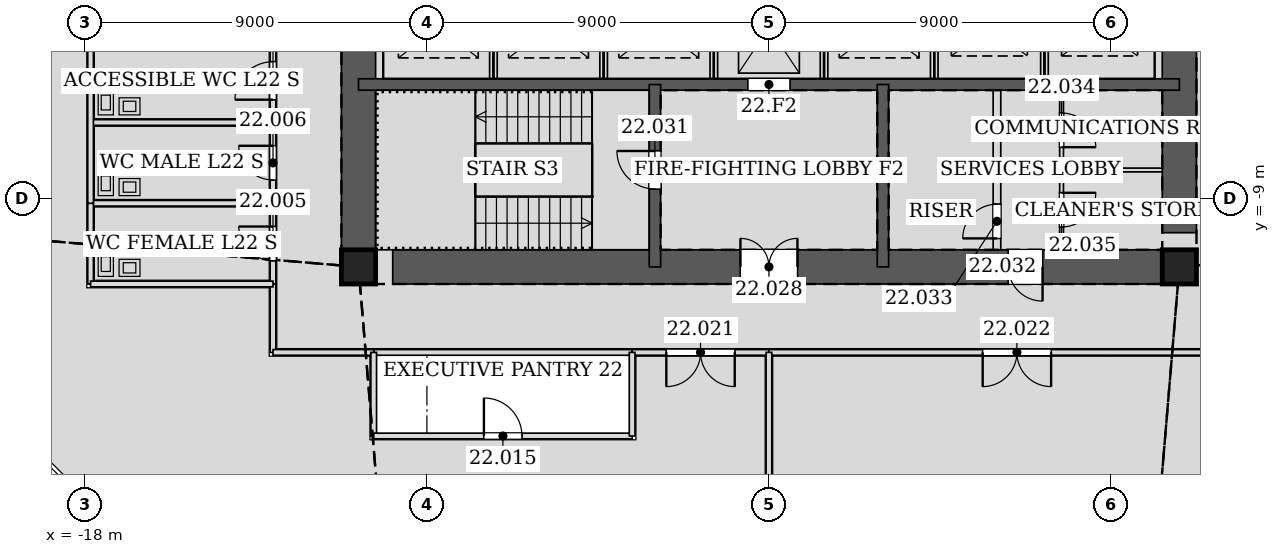
"""IFC4 building model, lengths in metres.
Left out: names, types, materials, properties, quantities, classifications, styles, units other than length and angle.
Written with IfcOpenShell. Run it as: python <this file> out.ifc"""

import sys

from ifc_helpers import new_model, si_unit, direction, frame, frame_2d, origin, origin_2d, place, context, subcontext, project, spatial, rectangle, hollow_rectangle, extrude, element, fill, save


model = new_model("IFC4")
c1 = context("Model", 3, precision=1e-05, world=origin(), true_north=direction((0.0, 1.0)))
c2 = subcontext(c1, "Body", "Model", "MODEL_VIEW")
j1 = project(units=[si_unit("LENGTHUNIT", "METRE"), si_unit("PLANEANGLEUNIT", "RADIAN")], contexts=[c1])
p1 = place(None, origin())
s1 = spatial("IfcSite", under=j1, at=p1, CompositionType="ELEMENT")
p2 = place(p1, origin())
s2 = spatial("IfcBuilding", under=s1, at=p2, CompositionType="ELEMENT")
p3 = place(p2, frame((0.0, 0.0, 100.2)))
s3 = spatial("IfcBuildingStorey", under=s2, at=p3, CompositionType="ELEMENT", Elevation=100.2)
for number, where, z_axis, x_axis in (
    (1, (-10.8, -10.8, 0.0), (0.0, 0.0, 1.0), (1.0, 0.0, 0.0)),
    (2, (10.8, -10.8, 0.0), (0.0, 0.0, 1.0), (1.0, 0.0, 0.0)),
):
    element("IfcColumn", number, at=place(p3, frame(where, z_axis=z_axis, x_axis=x_axis)), inside=s3, PredefinedType="COLUMN", context=c2, shape_type="SweptSolid", body=[
        extrude(hollow_rectangle(XDim=0.9, YDim=0.9, WallThickness=0.06, at=origin_2d()), origin(), (0.0, 0.0, 1.0), 4.2),
    ])
p4 = place(p3, frame((-10.8, -10.8, 0.0), z_axis=(0.0, 0.0, 1.0), x_axis=(1.0, 0.0, 0.0)))
e3 = element("IfcWall", 3, at=p4, inside=s3, PredefinedType="SOLIDWALL", context=c2, shape_type="SweptSolid", body=[
    extrude(rectangle(XDim=21.6, YDim=0.9, at=frame_2d((10.8, 0.0))), origin(), (0.0, 0.0, 1.0), 4.2),
])
p5 = place(p4, frame((10.05, 0.0, 0.0)))
e4 = element("IfcOpeningElement", 4, at=p5, cuts=e3, PredefinedType="OPENING", context=c2, shape_type="SweptSolid", body=[
    extrude(rectangle(XDim=1.5, YDim=2.1, at=frame_2d((0.75, 1.05))), frame((0.0, 0.46, 0.0), z_axis=(0.0, -1.0, 0.0), x_axis=(1.0, 0.0, 0.0)), (0.0, 0.0, 1.0), 0.92),
])
p6 = place(p4, frame((17.1, 0.0, 0.0)))
e5 = element("IfcOpeningElement", 5, at=p6, cuts=e3, PredefinedType="OPENING", context=c2, shape_type="SweptSolid", body=[
    extrude(rectangle(XDim=0.9, YDim=2.1, at=frame_2d((0.45, 1.05))), frame((0.0, 0.46, 0.0), z_axis=(0.0, -1.0, 0.0), x_axis=(1.0, 0.0, 0.0)), (0.0, 0.0, 1.0), 0.92),
])
p7 = place(p3, frame((10.8, -10.8, 0.0), z_axis=(0.0, 0.0, 1.0), x_axis=(0.0, 1.0, 0.0)))
e6 = element("IfcWall", 6, at=p7, inside=s3, PredefinedType="SOLIDWALL", context=c2, shape_type="SweptSolid", body=[
    extrude(rectangle(XDim=21.6, YDim=0.9, at=frame_2d((10.8, 0.0))), origin(), (0.0, 0.0, 1.0), 4.2),
])
p8 = place(p7, frame((11.7, 0.0, 0.0)))
e7 = element("IfcOpeningElement", 7, at=p8, cuts=e6, PredefinedType="OPENING", context=c2, shape_type="SweptSolid", body=[
    extrude(rectangle(XDim=1.2, YDim=2.1, at=frame_2d((0.6, 1.05))), frame((0.0, 0.46, 0.0), z_axis=(0.0, -1.0, 0.0), x_axis=(1.0, 0.0, 0.0)), (0.0, 0.0, 1.0), 0.92),
])
p9 = place(p7, frame((8.7, 0.0, 0.0)))
e8 = element("IfcOpeningElement", 8, at=p9, cuts=e6, PredefinedType="OPENING", context=c2, shape_type="SweptSolid", body=[
    extrude(rectangle(XDim=1.2, YDim=2.1, at=frame_2d((0.6, 1.05))), frame((0.0, 0.46, 0.0), z_axis=(0.0, -1.0, 0.0), x_axis=(1.0, 0.0, 0.0)), (0.0, 0.0, 1.0), 0.92),
])
p10 = place(p3, frame((-10.8, 10.8, 0.0), z_axis=(0.0, 0.0, 1.0), x_axis=(0.0, -1.0, 0.0)))
e9 = element("IfcWall", 9, at=p10, inside=s3, PredefinedType="SOLIDWALL", context=c2, shape_type="SweptSolid", body=[
    extrude(rectangle(XDim=21.6, YDim=0.9, at=frame_2d((10.8, 0.0))), origin(), (0.0, 0.0, 1.0), 4.2),
])
p11 = place(p10, frame((8.7, 0.0, 0.0)))
e10 = element("IfcOpeningElement", 10, at=p11, cuts=e9, PredefinedType="OPENING", context=c2, shape_type="SweptSolid", body=[
    extrude(rectangle(XDim=1.2, YDim=2.1, at=frame_2d((0.6, 1.05))), frame((0.0, 0.46, 0.0), z_axis=(0.0, -1.0, 0.0), x_axis=(1.0, 0.0, 0.0)), (0.0, 0.0, 1.0), 0.92),
])
p12 = place(p10, frame((11.7, 0.0, 0.0)))
e11 = element("IfcOpeningElement", 11, at=p12, cuts=e9, PredefinedType="OPENING", context=c2, shape_type="SweptSolid", body=[
    extrude(rectangle(XDim=1.2, YDim=2.1, at=frame_2d((0.6, 1.05))), frame((0.0, 0.46, 0.0), z_axis=(0.0, -1.0, 0.0), x_axis=(1.0, 0.0, 0.0)), (0.0, 0.0, 1.0), 0.92),
])
p13 = place(p3, frame((-10.8, -6.0, 0.0), z_axis=(0.0, 0.0, 1.0), x_axis=(1.0, 0.0, 0.0)))
e12 = element("IfcWall", 12, at=p13, inside=s3, PredefinedType="SOLIDWALL", context=c2, shape_type="SweptSolid", body=[
    extrude(rectangle(XDim=21.6, YDim=0.3, at=frame_2d((10.8, 0.0))), origin(), (0.0, 0.0, 1.0), 4.2),
])
p14 = place(p13, frame((10.25, 0.0, 0.0)))
e13 = element("IfcOpeningElement", 13, at=p14, cuts=e12, PredefinedType="OPENING", context=c2, shape_type="SweptSolid", body=[
    extrude(rectangle(XDim=1.1, YDim=2.1, at=frame_2d((0.55, 1.05))), frame((0.0, 0.16, 0.0), z_axis=(0.0, -1.0, 0.0), x_axis=(1.0, 0.0, 0.0)), (0.0, 0.0, 1.0), 0.32),
])
p15 = place(p3, frame((-3.0, -6.0, 0.0), z_axis=(0.0, 0.0, 1.0), x_axis=(0.0, -1.0, 0.0)))
e14 = element("IfcWall", 14, at=p15, inside=s3, PredefinedType="SOLIDWALL", context=c2, shape_type="SweptSolid", body=[
    extrude(rectangle(XDim=4.8, YDim=0.3, at=frame_2d((2.4, 0.0))), origin(), (0.0, 0.0, 1.0), 4.2),
])
p16 = place(p15, frame((1.75, 0.0, 0.0)))
e15 = element("IfcOpeningElement", 15, at=p16, cuts=e14, PredefinedType="OPENING", context=c2, shape_type="SweptSolid", body=[
    extrude(rectangle(XDim=1.0, YDim=2.1, at=frame_2d((0.5, 1.05))), frame((0.0, 0.16, 0.0), z_axis=(0.0, -1.0, 0.0), x_axis=(1.0, 0.0, 0.0)), (0.0, 0.0, 1.0), 0.32),
])
p17 = place(p3, frame((3.0, -6.0, 0.0), z_axis=(0.0, 0.0, 1.0), x_axis=(0.0, -1.0, 0.0)))
e16 = element("IfcWall", 16, at=p17, inside=s3, PredefinedType="SOLIDWALL", context=c2, shape_type="SweptSolid", body=[
    extrude(rectangle(XDim=4.8, YDim=0.3, at=frame_2d((2.4, 0.0))), origin(), (0.0, 0.0, 1.0), 4.2),
])
p18 = place(p3, frame((-13.05, -9.124, 0.0), z_axis=(0.0, 0.0, 1.0), x_axis=(0.0, -1.0, 0.0)))
e17 = element("IfcWall", 17, at=p18, inside=s3, PredefinedType="PARTITIONING", context=c2, shape_type="SweptSolid", body=[
    extrude(rectangle(XDim=2.127, YDim=0.15, at=frame_2d((1.063, 0.0))), origin(), (0.0, 0.0, 1.0), 3.04),
])
p19 = place(p18, frame((0.614, 0.0, 0.0)))
e18 = element("IfcOpeningElement", 18, at=p19, cuts=e17, PredefinedType="OPENING", context=c2, shape_type="SweptSolid", body=[
    extrude(rectangle(XDim=0.9, YDim=2.1, at=frame_2d((0.45, 1.05))), frame((0.0, 0.085, 0.0), z_axis=(0.0, -1.0, 0.0), x_axis=(1.0, 0.0, 0.0)), (0.0, 0.0, 1.0), 0.17),
])
p20 = place(p3, frame((-13.05, -6.999, 0.0), z_axis=(0.0, 0.0, 1.0), x_axis=(0.0, -1.0, 0.0)))
e19 = element("IfcWall", 19, at=p20, inside=s3, PredefinedType="PARTITIONING", context=c2, shape_type="SweptSolid", body=[
    extrude(rectangle(XDim=2.127, YDim=0.15, at=frame_2d((1.063, 0.0))), origin(), (0.0, 0.0, 1.0), 3.95),
])
p21 = place(p20, frame((0.614, 0.0, 0.0)))
e20 = element("IfcOpeningElement", 20, at=p21, cuts=e19, PredefinedType="OPENING", context=c2, shape_type="SweptSolid", body=[
    extrude(rectangle(XDim=0.9, YDim=2.1, at=frame_2d((0.45, 1.05))), frame((0.0, 0.085, 0.0), z_axis=(0.0, -1.0, 0.0), x_axis=(1.0, 0.0, 0.0)), (0.0, 0.0, 1.0), 0.17),
])
p22 = place(p3, frame((-13.05, -4.799, 0.0), z_axis=(0.0, 0.0, 1.0), x_axis=(0.0, -1.0, 0.0)))
e21 = element("IfcWall", 21, at=p22, inside=s3, PredefinedType="PARTITIONING", context=c2, shape_type="SweptSolid", body=[
    extrude(rectangle(XDim=2.202, YDim=0.15, at=frame_2d((1.101, 0.0))), origin(), (0.0, 0.0, 1.0), 3.95),
])
p23 = place(p22, frame((0.601, 0.0, 0.0)))
e22 = element("IfcOpeningElement", 22, at=p23, cuts=e21, PredefinedType="OPENING", context=c2, shape_type="SweptSolid", body=[
    extrude(rectangle(XDim=1.0, YDim=2.1, at=frame_2d((0.5, 1.05))), frame((0.0, 0.085, 0.0), z_axis=(0.0, -1.0, 0.0), x_axis=(1.0, 0.0, 0.0)), (0.0, 0.0, 1.0), 0.17),
])
p24 = place(p3, frame((-10.401, -13.05, 0.0), z_axis=(0.0, 0.0, 1.0), x_axis=(1.0, 0.0, 0.0)))
e23 = element("IfcWall", 23, at=p24, inside=s3, PredefinedType="PARTITIONING", context=c2, shape_type="SweptSolid", body=[
    extrude(rectangle(XDim=6.802, YDim=0.15, at=frame_2d((3.401, 0.0))), origin(), (0.0, 0.0, 1.0), 3.04),
])
p25 = place(p3, frame((-13.05, -11.249, 0.0), z_axis=(0.0, 0.0, 1.0), x_axis=(0.0, -1.0, 0.0)))
e24 = element("IfcWall", 24, at=p25, inside=s3, PredefinedType="PARTITIONING", context=c2, shape_type="SweptSolid", body=[
    extrude(rectangle(XDim=1.801, YDim=0.15, at=frame_2d((0.9, 0.0))), origin(), (0.0, 0.0, 1.0), 2.84),
])
p26 = place(p3, frame((-13.05, -13.05, 0.0), z_axis=(0.0, 0.0, 1.0), x_axis=(1.0, 0.0, 0.0)))
e25 = element("IfcWall", 25, at=p26, inside=s3, PredefinedType="PARTITIONING", context=c2, shape_type="SweptSolid", body=[
    extrude(rectangle(XDim=2.651, YDim=0.15, at=frame_2d((1.326, 0.0))), origin(), (0.0, 0.0, 1.0), 2.84),
])
p27 = place(p3, frame((-3.601, -13.05, 0.0), z_axis=(0.0, 0.0, 1.0), x_axis=(1.0, 0.0, 0.0)))
e26 = element("IfcWall", 26, at=p27, inside=s3, PredefinedType="PARTITIONING", context=c2, shape_type="SweptSolid", body=[
    extrude(rectangle(XDim=3.602, YDim=0.15, at=frame_2d((1.801, 0.0))), origin(), (0.0, 0.0, 1.0), 2.64),
])
p28 = place(p27, frame((0.901, 0.0, 0.0)))
e27 = element("IfcOpeningElement", 27, at=p28, cuts=e26, PredefinedType="OPENING", context=c2, shape_type="SweptSolid", body=[
    extrude(rectangle(XDim=1.8, YDim=2.4, at=frame_2d((0.9, 1.2))), frame((0.0, 0.085, 0.0), z_axis=(0.0, -1.0, 0.0), x_axis=(1.0, 0.0, 0.0)), (0.0, 0.0, 1.0), 0.17),
])
p29 = place(p3, frame((-0.001, -13.05, 0.0), z_axis=(0.0, 0.0, 1.0), x_axis=(1.0, 0.0, 0.0)))
e28 = element("IfcWall", 28, at=p29, inside=s3, PredefinedType="PARTITIONING", context=c2, shape_type="SweptSolid", body=[
    extrude(rectangle(XDim=13.051, YDim=0.15, at=frame_2d((6.525, 0.0))), origin(), (0.0, 0.0, 1.0), 2.64),
])
p30 = place(p29, frame((5.625, 0.0, 0.0)))
e29 = element("IfcOpeningElement", 29, at=p30, cuts=e28, PredefinedType="OPENING", context=c2, shape_type="SweptSolid", body=[
    extrude(rectangle(XDim=1.8, YDim=2.4, at=frame_2d((0.9, 1.2))), frame((0.0, 0.085, 0.0), z_axis=(0.0, -1.0, 0.0), x_axis=(1.0, 0.0, 0.0)), (0.0, 0.0, 1.0), 0.17),
])
p31 = place(p3, frame((-13.05, -9.125, 0.0), z_axis=(0.0, 0.0, 1.0), x_axis=(-1.0, 0.0, 0.0)))
e30 = element("IfcWall", 30, at=p31, inside=s3, PredefinedType="PARTITIONING", context=c2, shape_type="SweptSolid", body=[
    extrude(rectangle(XDim=4.8, YDim=0.15, at=frame_2d((2.4, 0.0))), origin(), (0.0, 0.0, 1.0), 3.028),
])
p32 = place(p3, frame((-17.85, -9.125, 0.0), z_axis=(0.0, 0.0, 1.0), x_axis=(0.0, -1.0, 0.0)))
e31 = element("IfcWall", 31, at=p32, inside=s3, PredefinedType="PARTITIONING", context=c2, shape_type="SweptSolid", body=[
    extrude(rectangle(XDim=2.125, YDim=0.15, at=frame_2d((1.062, 0.0))), origin(), (0.0, 0.0, 1.0), 3.04),
])
p33 = place(p3, frame((-17.85, -11.25, 0.0), z_axis=(0.0, 0.0, 1.0), x_axis=(1.0, 0.0, 0.0)))
e32 = element("IfcWall", 32, at=p33, inside=s3, PredefinedType="PARTITIONING", context=c2, shape_type="SweptSolid", body=[
    extrude(rectangle(XDim=4.8, YDim=0.15, at=frame_2d((2.4, 0.0))), origin(), (0.0, 0.0, 1.0), 3.63),
])
p34 = place(p3, frame((-13.05, -7.0, 0.0), z_axis=(0.0, 0.0, 1.0), x_axis=(-1.0, 0.0, 0.0)))
e33 = element("IfcWall", 33, at=p34, inside=s3, PredefinedType="PARTITIONING", context=c2, shape_type="SweptSolid", body=[
    extrude(rectangle(XDim=4.8, YDim=0.15, at=frame_2d((2.4, 0.0))), origin(), (0.0, 0.0, 1.0), 3.028),
])
p35 = place(p3, frame((-17.85, -9.125, 0.0), z_axis=(0.0, 0.0, 1.0), x_axis=(0.0, 1.0, 0.0)))
e34 = element("IfcWall", 34, at=p35, inside=s3, PredefinedType="PARTITIONING", context=c2, shape_type="SweptSolid", body=[
    extrude(rectangle(XDim=6.125, YDim=0.15, at=frame_2d((3.062, 0.0))), origin(), (0.0, 0.0, 1.0), 3.95),
])
p36 = place(p3, frame((-10.4, -13.05, 0.0), z_axis=(0.0, 0.0, 1.0), x_axis=(0.0, -1.0, 0.0)))
e35 = element("IfcWall", 35, at=p36, inside=s3, PredefinedType="PARTITIONING", context=c2, shape_type="SweptSolid", body=[
    extrude(rectangle(XDim=2.2, YDim=0.15, at=frame_2d((1.1, 0.0))), origin(), (0.0, 0.0, 1.0), 3.028),
])
p37 = place(p3, frame((-10.4, -15.25, 0.0), z_axis=(0.0, 0.0, 1.0), x_axis=(1.0, 0.0, 0.0)))
e36 = element("IfcWall", 36, at=p37, inside=s3, PredefinedType="PARTITIONING", context=c2, shape_type="SweptSolid", body=[
    extrude(rectangle(XDim=6.8, YDim=0.15, at=frame_2d((3.4, 0.0))), origin(), (0.0, 0.0, 1.0), 3.04),
])
p38 = place(p37, frame((2.9, 0.0, 0.0)))
e37 = element("IfcOpeningElement", 37, at=p38, cuts=e36, PredefinedType="OPENING", context=c2, shape_type="SweptSolid", body=[
    extrude(rectangle(XDim=1.0, YDim=2.1, at=frame_2d((0.5, 1.05))), frame((0.0, 0.085, 0.0), z_axis=(0.0, -1.0, 0.0), x_axis=(1.0, 0.0, 0.0)), (0.0, 0.0, 1.0), 0.17),
])
p39 = place(p3, frame((-3.6, -15.25, 0.0), z_axis=(0.0, 0.0, 1.0), x_axis=(0.0, 1.0, 0.0)))
e38 = element("IfcWall", 38, at=p39, inside=s3, PredefinedType="PARTITIONING", context=c2, shape_type="SweptSolid", body=[
    extrude(rectangle(XDim=2.2, YDim=0.15, at=frame_2d((1.1, 0.0))), origin(), (0.0, 0.0, 1.0), 3.028),
])
p40 = place(p3, frame((0.0, -18.73, 0.0), z_axis=(0.0, 0.0, 1.0), x_axis=(0.0, 1.0, 0.0)))
e39 = element("IfcWall", 39, at=p40, inside=s3, PredefinedType="PARTITIONING", context=c2, shape_type="SweptSolid", body=[
    extrude(rectangle(XDim=5.68, YDim=0.15, at=frame_2d((2.84, 0.0))), origin(), (0.0, 0.0, 1.0), 2.64),
])
for number, where, z_axis, x_axis in (
    (40, (-7.25, -5.85, 0.0), (0.0, 0.0, 1.0), (0.0, 1.0, 0.0)),
    (41, (-4.35, -5.85, 0.0), (0.0, 0.0, 1.0), (0.0, 1.0, 0.0)),
    (42, (-1.45, -5.85, 0.0), (0.0, 0.0, 1.0), (0.0, 1.0, 0.0)),
    (43, (1.45, -5.85, 0.0), (0.0, 0.0, 1.0), (0.0, 1.0, 0.0)),
    (44, (4.35, -5.85, 0.0), (0.0, 0.0, 1.0), (0.0, 1.0, 0.0)),
    (45, (7.25, -5.85, 0.0), (0.0, 0.0, 1.0), (0.0, 1.0, 0.0)),
):
    element("IfcWall", number, at=place(p3, frame(where, z_axis=z_axis, x_axis=x_axis)), inside=s3, PredefinedType="PARTITIONING", context=c2, shape_type="SweptSolid", body=[
        extrude(rectangle(XDim=2.7, YDim=0.2, at=frame_2d((1.35, 0.0))), origin(), (0.0, 0.0, 1.0), 4.2),
    ])
p41 = place(p3, frame((6.0, -10.35, 0.0), z_axis=(0.0, 0.0, 1.0), x_axis=(0.0, 1.0, 0.0)))
e46 = element("IfcWall", 46, at=p41, inside=s3, PredefinedType="PARTITIONING", context=c2, shape_type="SweptSolid", body=[
    extrude(rectangle(XDim=4.2, YDim=0.2, at=frame_2d((2.1, 0.0))), origin(), (0.0, 0.0, 1.0), 3.95),
])
p42 = place(p41, frame((0.3, 0.0, 0.0)))
e47 = element("IfcOpeningElement", 47, at=p42, cuts=e46, PredefinedType="OPENING", context=c2, shape_type="SweptSolid", body=[
    extrude(rectangle(XDim=0.9, YDim=2.1, at=frame_2d((0.45, 1.05))), frame((0.0, 0.11, 0.0), z_axis=(0.0, -1.0, 0.0), x_axis=(1.0, 0.0, 0.0)), (0.0, 0.0, 1.0), 0.22),
])
p43 = place(p3, frame((7.7, -10.35, 0.0), z_axis=(0.0, 0.0, 1.0), x_axis=(0.0, 1.0, 0.0)))
e48 = element("IfcWall", 48, at=p43, inside=s3, PredefinedType="PARTITIONING", context=c2, shape_type="SweptSolid", body=[
    extrude(rectangle(XDim=4.2, YDim=0.1, at=frame_2d((2.1, 0.0))), origin(), (0.0, 0.0, 1.0), 3.95),
])
p44 = place(p43, frame((2.7, 0.0, 0.0)))
e49 = element("IfcOpeningElement", 49, at=p44, cuts=e48, PredefinedType="OPENING", context=c2, shape_type="SweptSolid", body=[
    extrude(rectangle(XDim=0.9, YDim=2.1, at=frame_2d((0.45, 1.05))), frame((0.0, 0.06, 0.0), z_axis=(0.0, -1.0, 0.0), x_axis=(1.0, 0.0, 0.0)), (0.0, 0.0, 1.0), 0.12),
])
p45 = place(p43, frame((0.6, 0.0, 0.0)))
e50 = element("IfcOpeningElement", 50, at=p45, cuts=e48, PredefinedType="OPENING", context=c2, shape_type="SweptSolid", body=[
    extrude(rectangle(XDim=0.9, YDim=2.1, at=frame_2d((0.45, 1.05))), frame((0.0, 0.06, 0.0), z_axis=(0.0, -1.0, 0.0), x_axis=(1.0, 0.0, 0.0)), (0.0, 0.0, 1.0), 0.12),
])
p46 = place(p3, frame((7.7, -8.25, 0.0), z_axis=(0.0, 0.0, 1.0), x_axis=(1.0, 0.0, 0.0)))
e51 = element("IfcWall", 51, at=p46, inside=s3, PredefinedType="PARTITIONING", context=c2, shape_type="SweptSolid", body=[
    extrude(rectangle(XDim=2.65, YDim=0.1, at=frame_2d((1.325, 0.0))), origin(), (0.0, 0.0, 1.0), 3.95),
])
p47 = place(p19, frame((0.9, 0.0, 0.0), z_axis=(0.0, 0.0, 1.0), x_axis=(-1.0, 0.0, 0.0)))
e52 = element("IfcDoor", 52, at=p47, inside=s3, OperationType="SINGLE_SWING_RIGHT", PredefinedType="DOOR", context=c2, shape_type="SweptSolid", body=[
    extrude(rectangle(XDim=0.9, YDim=2.1, at=frame_2d((0.45, 1.05))), frame((0.0, 0.025, 0.0), z_axis=(0.0, -1.0, 0.0), x_axis=(1.0, 0.0, 0.0)), (0.0, 0.0, 1.0), 0.05),
])
fill(e18, e52)
p48 = place(p21, frame((0.9, 0.0, 0.0), z_axis=(0.0, 0.0, 1.0), x_axis=(-1.0, 0.0, 0.0)))
e53 = element("IfcDoor", 53, at=p48, inside=s3, OperationType="SINGLE_SWING_RIGHT", PredefinedType="DOOR", context=c2, shape_type="SweptSolid", body=[
    extrude(rectangle(XDim=0.9, YDim=2.1, at=frame_2d((0.45, 1.05))), frame((0.0, 0.025, 0.0), z_axis=(0.0, -1.0, 0.0), x_axis=(1.0, 0.0, 0.0)), (0.0, 0.0, 1.0), 0.05),
])
fill(e20, e53)
p49 = place(p23, frame((1.0, 0.0, 0.0), z_axis=(0.0, 0.0, 1.0), x_axis=(-1.0, 0.0, 0.0)))
e54 = element("IfcDoor", 54, at=p49, inside=s3, OperationType="SINGLE_SWING_LEFT", PredefinedType="DOOR", context=c2, shape_type="SweptSolid", body=[
    extrude(rectangle(XDim=1.0, YDim=2.1, at=frame_2d((0.5, 1.05))), frame((0.0, 0.025, 0.0), z_axis=(0.0, -1.0, 0.0), x_axis=(1.0, 0.0, 0.0)), (0.0, 0.0, 1.0), 0.05),
])
fill(e22, e54)
p50 = place(p38, origin())
e55 = element("IfcDoor", 55, at=p50, inside=s3, OperationType="SINGLE_SWING_LEFT", PredefinedType="DOOR", context=c2, shape_type="SweptSolid", body=[
    extrude(rectangle(XDim=1.0, YDim=2.1, at=frame_2d((0.5, 1.05))), frame((0.0, 0.025, 0.0), z_axis=(0.0, -1.0, 0.0), x_axis=(1.0, 0.0, 0.0)), (0.0, 0.0, 1.0), 0.05),
])
fill(e37, e55)
p51 = place(p28, frame((1.8, 0.0, 0.0), z_axis=(0.0, 0.0, 1.0), x_axis=(-1.0, 0.0, 0.0)))
e56 = element("IfcDoor", 56, at=p51, inside=s3, OperationType="DOUBLE_DOOR_SINGLE_SWING", PredefinedType="DOOR", context=c2, shape_type="SweptSolid", body=[
    extrude(rectangle(XDim=1.8, YDim=2.4, at=frame_2d((0.9, 1.2))), frame((0.0, 0.025, 0.0), z_axis=(0.0, -1.0, 0.0), x_axis=(1.0, 0.0, 0.0)), (0.0, 0.0, 1.0), 0.05),
])
fill(e27, e56)
p52 = place(p30, frame((1.8, 0.0, 0.0), z_axis=(0.0, 0.0, 1.0), x_axis=(-1.0, 0.0, 0.0)))
e57 = element("IfcDoor", 57, at=p52, inside=s3, OperationType="DOUBLE_DOOR_SINGLE_SWING", PredefinedType="DOOR", context=c2, shape_type="SweptSolid", body=[
    extrude(rectangle(XDim=1.8, YDim=2.4, at=frame_2d((0.9, 1.2))), frame((0.0, 0.025, 0.0), z_axis=(0.0, -1.0, 0.0), x_axis=(1.0, 0.0, 0.0)), (0.0, 0.0, 1.0), 0.05),
])
fill(e29, e57)
p53 = place(p5, origin())
e58 = element("IfcDoor", 58, at=p53, inside=s3, OperationType="DOUBLE_DOOR_SINGLE_SWING", PredefinedType="DOOR", context=c2, shape_type="SweptSolid", body=[
    extrude(rectangle(XDim=1.5, YDim=2.1, at=frame_2d((0.75, 1.05))), frame((0.0, 0.025, 0.0), z_axis=(0.0, -1.0, 0.0), x_axis=(1.0, 0.0, 0.0)), (0.0, 0.0, 1.0), 0.05),
])
fill(e4, e58)
p54 = place(p16, frame((1.0, 0.0, 0.0), z_axis=(0.0, 0.0, 1.0), x_axis=(-1.0, 0.0, 0.0)))
e59 = element("IfcDoor", 59, at=p54, inside=s3, OperationType="SINGLE_SWING_RIGHT", PredefinedType="DOOR", context=c2, shape_type="SweptSolid", body=[
    extrude(rectangle(XDim=1.0, YDim=2.1, at=frame_2d((0.5, 1.05))), frame((0.0, 0.025, 0.0), z_axis=(0.0, -1.0, 0.0), x_axis=(1.0, 0.0, 0.0)), (0.0, 0.0, 1.0), 0.05),
])
fill(e15, e59)
p55 = place(p6, frame((0.9, 0.0, 0.0), z_axis=(0.0, 0.0, 1.0), x_axis=(-1.0, 0.0, 0.0)))
e60 = element("IfcDoor", 60, at=p55, inside=s3, OperationType="SINGLE_SWING_LEFT", PredefinedType="DOOR", context=c2, shape_type="SweptSolid", body=[
    extrude(rectangle(XDim=0.9, YDim=2.1, at=frame_2d((0.45, 1.05))), frame((0.0, 0.025, 0.0), z_axis=(0.0, -1.0, 0.0), x_axis=(1.0, 0.0, 0.0)), (0.0, 0.0, 1.0), 0.05),
])
fill(e5, e60)
p56 = place(p42, origin())
e61 = element("IfcDoor", 61, at=p56, inside=s3, OperationType="SINGLE_SWING_LEFT", PredefinedType="DOOR", context=c2, shape_type="SweptSolid", body=[
    extrude(rectangle(XDim=0.9, YDim=2.1, at=frame_2d((0.45, 1.05))), frame((0.0, 0.025, 0.0), z_axis=(0.0, -1.0, 0.0), x_axis=(1.0, 0.0, 0.0)), (0.0, 0.0, 1.0), 0.05),
])
fill(e47, e61)
p57 = place(p44, frame((0.9, 0.0, 0.0), z_axis=(0.0, 0.0, 1.0), x_axis=(-1.0, 0.0, 0.0)))
e62 = element("IfcDoor", 62, at=p57, inside=s3, OperationType="SINGLE_SWING_RIGHT", PredefinedType="DOOR", context=c2, shape_type="SweptSolid", body=[
    extrude(rectangle(XDim=0.9, YDim=2.1, at=frame_2d((0.45, 1.05))), frame((0.0, 0.025, 0.0), z_axis=(0.0, -1.0, 0.0), x_axis=(1.0, 0.0, 0.0)), (0.0, 0.0, 1.0), 0.05),
])
fill(e49, e62)
p58 = place(p45, frame((0.9, 0.0, 0.0), z_axis=(0.0, 0.0, 1.0), x_axis=(-1.0, 0.0, 0.0)))
e63 = element("IfcDoor", 63, at=p58, inside=s3, OperationType="SINGLE_SWING_LEFT", PredefinedType="DOOR", context=c2, shape_type="SweptSolid", body=[
    extrude(rectangle(XDim=0.9, YDim=2.1, at=frame_2d((0.45, 1.05))), frame((0.0, 0.025, 0.0), z_axis=(0.0, -1.0, 0.0), x_axis=(1.0, 0.0, 0.0)), (0.0, 0.0, 1.0), 0.05),
])
fill(e50, e63)
p59 = place(p14, origin())
e64 = element("IfcDoor", 64, at=p59, inside=s3, OperationType="DOUBLE_DOOR_SLIDING", PredefinedType="DOOR", context=c2, shape_type="SweptSolid", body=[
    extrude(rectangle(XDim=1.1, YDim=2.1, at=frame_2d((0.55, 1.05))), frame((0.0, 0.025, 0.0), z_axis=(0.0, -1.0, 0.0), x_axis=(1.0, 0.0, 0.0)), (0.0, 0.0, 1.0), 0.05),
])
fill(e13, e64)
save(model, sys.argv[1])
